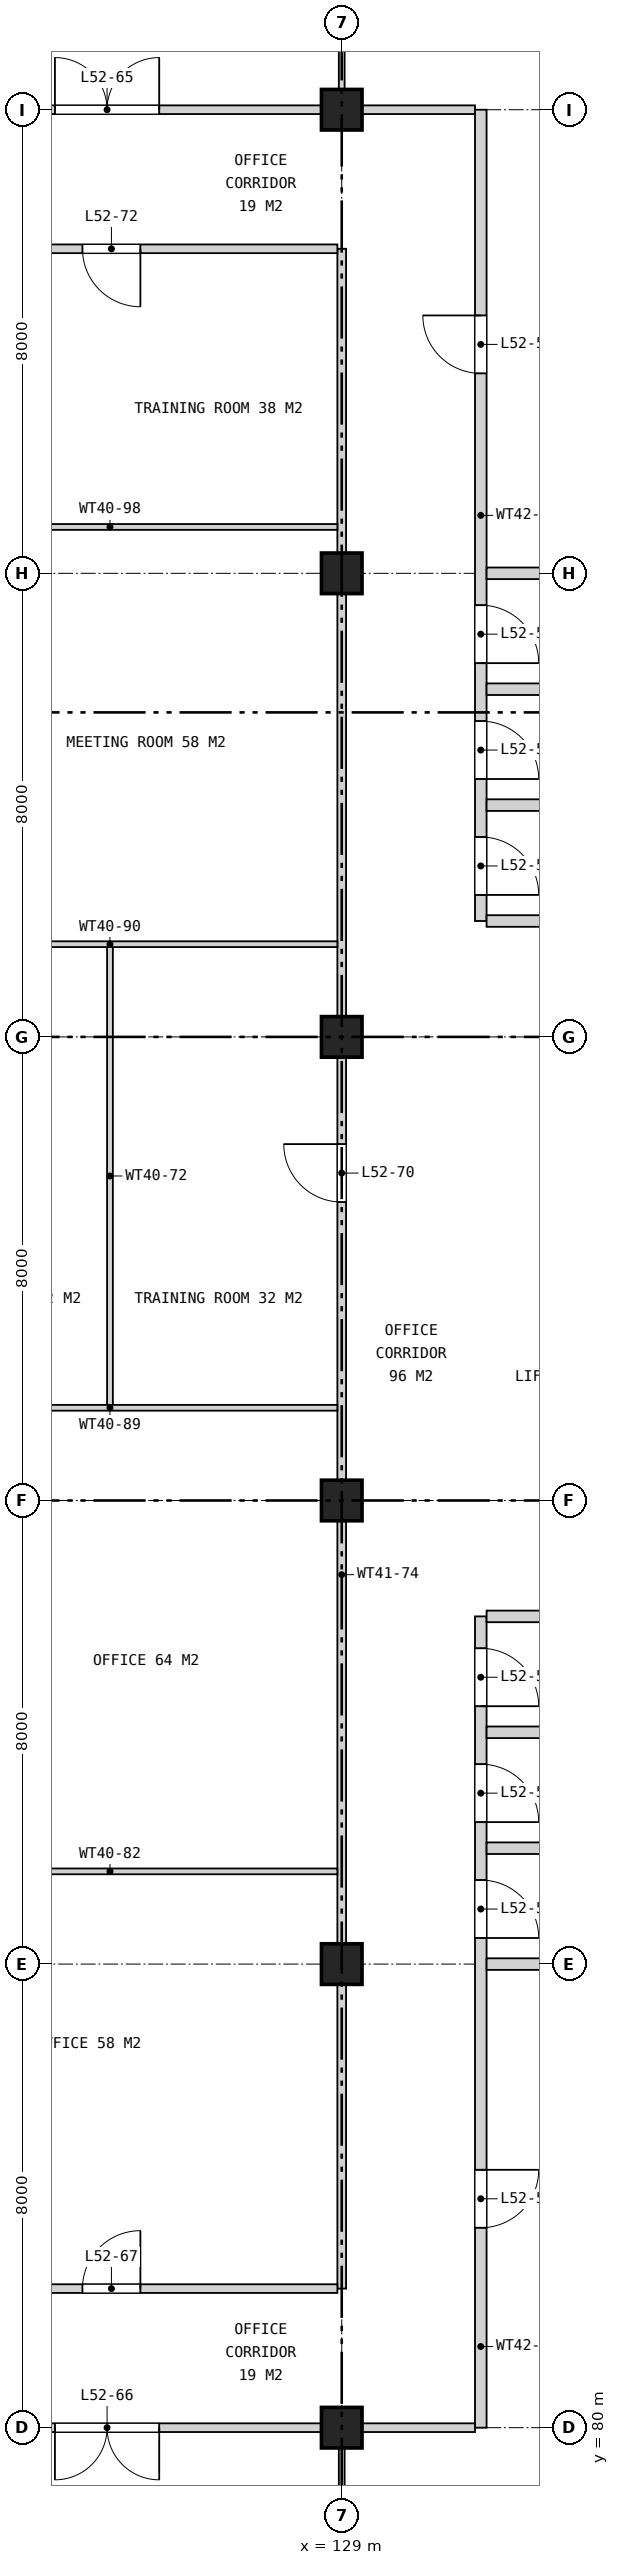
"""IFC4 building model, lengths in metres.
Left out: names, types, materials, properties, quantities, classifications, styles, units other than length and angle.
Written with IfcOpenShell. Run it as: python <this file> out.ifc"""

import sys

from ifc_helpers import new_model, si_unit, direction, frame, frame_2d, origin, origin_2d, place, context, subcontext, project, spatial, rectangle, extrude, element, fill, save


model = new_model("IFC4")
c1 = context("Model", 3, precision=1e-05, world=origin(), true_north=direction((0.0, 1.0)))
c2 = subcontext(c1, "Body", "Model", "MODEL_VIEW")
j1 = project(units=[si_unit("LENGTHUNIT", "METRE"), si_unit("PLANEANGLEUNIT", "RADIAN")], contexts=[c1])
p1 = place(None, origin())
s1 = spatial("IfcSite", under=j1, at=p1, CompositionType="ELEMENT")
p2 = place(p1, origin())
s2 = spatial("IfcBuilding", under=s1, at=p2, CompositionType="ELEMENT")
p3 = place(p2, frame((0.0, 0.0, 245.1)))
s3 = spatial("IfcBuildingStorey", under=s2, at=p3, CompositionType="ELEMENT", Elevation=245.1)
for number, where, z_axis, x_axis in (
    (1, (129.0, 80.0, 0.0), (0.0, 0.0, 1.0), (1.0, 0.0, 0.0)),
    (2, (129.0, 88.0, 0.0), (0.0, 0.0, 1.0), (1.0, 0.0, 0.0)),
    (3, (129.0, 96.0, 0.0), (0.0, 0.0, 1.0), (1.0, 0.0, 0.0)),
    (4, (129.0, 104.0, 0.0), (0.0, 0.0, 1.0), (1.0, 0.0, 0.0)),
    (5, (129.0, 112.0, 0.0), (0.0, 0.0, 1.0), (1.0, 0.0, 0.0)),
    (6, (129.0, 120.0, 0.0), (0.0, 0.0, 1.0), (1.0, 0.0, 0.0)),
):
    element("IfcColumn", number, at=place(p3, frame(where, z_axis=z_axis, x_axis=x_axis)), inside=s3, PredefinedType="COLUMN", context=c2, shape_type="SweptSolid", body=[
        extrude(rectangle(XDim=0.7, YDim=0.7, at=origin_2d()), origin(), (0.0, 0.0, 1.0), 4.2),
    ])
p4 = place(p3, frame((125.0, 97.65, 0.0), z_axis=(0.0, 0.0, 1.0), x_axis=(0.0, 1.0, 0.0)))
e7 = element("IfcWall", 7, at=p4, inside=s3, PredefinedType="PARTITIONING", context=c2, shape_type="SweptSolid", body=[
    extrude(rectangle(XDim=7.9, YDim=0.1, at=frame_2d((3.95, 0.0))), origin(), (0.0, 0.0, 1.0), 3.443),
])
p5 = place(p3, frame((129.0, 71.73, 0.0), z_axis=(0.0, 0.0, 1.0), x_axis=(0.0, 1.0, 0.0)))
e8 = element("IfcWall", 8, at=p5, inside=s3, PredefinedType="PARTITIONING", context=c2, shape_type="SweptSolid", body=[
    extrude(rectangle(XDim=8.195, YDim=0.1, at=frame_2d((4.098, 0.0))), origin(), (0.0, 0.0, 1.0), 3.443),
])
p6 = place(p3, frame((129.0, 82.4, 0.0), z_axis=(0.0, 0.0, 1.0), x_axis=(0.0, 1.0, 0.0)))
e9 = element("IfcWall", 9, at=p6, inside=s3, PredefinedType="PARTITIONING", context=c2, shape_type="SweptSolid", body=[
    extrude(rectangle(XDim=35.2, YDim=0.15, at=frame_2d((17.6, 0.0))), origin(), (0.0, 0.0, 1.0), 3.443),
])
p7 = place(p6, frame((18.75, 0.0, 0.0)))
e10 = element("IfcOpeningElement", 10, at=p7, cuts=e9, PredefinedType="OPENING", context=c2, shape_type="SweptSolid", body=[
    extrude(rectangle(XDim=1.0, YDim=2.1, at=frame_2d((0.5, 1.05))), frame((0.0, 0.085, 0.0), z_axis=(0.0, -1.0, 0.0), x_axis=(1.0, 0.0, 0.0)), (0.0, 0.0, 1.0), 0.17),
])
p8 = place(p3, frame((129.0, 120.075, 0.0), z_axis=(0.0, 0.0, 1.0), x_axis=(0.0, 1.0, 0.0)))
e11 = element("IfcWall", 11, at=p8, inside=s3, PredefinedType="PARTITIONING", context=c2, shape_type="SweptSolid", body=[
    extrude(rectangle(XDim=8.195, YDim=0.1, at=frame_2d((4.098, 0.0))), origin(), (0.0, 0.0, 1.0), 3.443),
])
p9 = place(p3, frame((131.4, 80.0, 0.0), z_axis=(0.0, 0.0, 1.0), x_axis=(0.0, 1.0, 0.0)))
e12 = element("IfcWall", 12, at=p9, inside=s3, PredefinedType="SOLIDWALL", context=c2, shape_type="SweptSolid", body=[
    extrude(rectangle(XDim=14.0, YDim=0.2, at=frame_2d((7.0, 0.0))), origin(), (0.0, 0.0, 1.0), 3.443),
])
p10 = place(p9, frame((12.45, 0.0, 0.0)))
e13 = element("IfcOpeningElement", 13, at=p10, cuts=e12, PredefinedType="OPENING", context=c2, shape_type="SweptSolid", body=[
    extrude(rectangle(XDim=1.0, YDim=2.1, at=frame_2d((0.5, 1.05))), frame((0.0, 0.11, 0.0), z_axis=(0.0, -1.0, 0.0), x_axis=(1.0, 0.0, 0.0)), (0.0, 0.0, 1.0), 0.22),
])
p11 = place(p9, frame((10.45, 0.0, 0.0)))
e14 = element("IfcOpeningElement", 14, at=p11, cuts=e12, PredefinedType="OPENING", context=c2, shape_type="SweptSolid", body=[
    extrude(rectangle(XDim=1.0, YDim=2.1, at=frame_2d((0.5, 1.05))), frame((0.0, 0.11, 0.0), z_axis=(0.0, -1.0, 0.0), x_axis=(1.0, 0.0, 0.0)), (0.0, 0.0, 1.0), 0.22),
])
p12 = place(p9, frame((8.45, 0.0, 0.0)))
e15 = element("IfcOpeningElement", 15, at=p12, cuts=e12, PredefinedType="OPENING", context=c2, shape_type="SweptSolid", body=[
    extrude(rectangle(XDim=1.0, YDim=2.1, at=frame_2d((0.5, 1.05))), frame((0.0, 0.11, 0.0), z_axis=(0.0, -1.0, 0.0), x_axis=(1.0, 0.0, 0.0)), (0.0, 0.0, 1.0), 0.22),
])
p13 = place(p9, frame((3.45, 0.0, 0.0)))
e16 = element("IfcOpeningElement", 16, at=p13, cuts=e12, PredefinedType="OPENING", context=c2, shape_type="SweptSolid", body=[
    extrude(rectangle(XDim=1.0, YDim=2.1, at=frame_2d((0.5, 1.05))), frame((0.0, 0.11, 0.0), z_axis=(0.0, -1.0, 0.0), x_axis=(1.0, 0.0, 0.0)), (0.0, 0.0, 1.0), 0.22),
])
p14 = place(p3, frame((131.4, 106.0, 0.0), z_axis=(0.0, 0.0, 1.0), x_axis=(0.0, 1.0, 0.0)))
e17 = element("IfcWall", 17, at=p14, inside=s3, PredefinedType="SOLIDWALL", context=c2, shape_type="SweptSolid", body=[
    extrude(rectangle(XDim=14.0, YDim=0.2, at=frame_2d((7.0, 0.0))), origin(), (0.0, 0.0, 1.0), 3.443),
])
p15 = place(p14, frame((0.45, 0.0, 0.0)))
e18 = element("IfcOpeningElement", 18, at=p15, cuts=e17, PredefinedType="OPENING", context=c2, shape_type="SweptSolid", body=[
    extrude(rectangle(XDim=1.0, YDim=2.1, at=frame_2d((0.5, 1.05))), frame((0.0, 0.11, 0.0), z_axis=(0.0, -1.0, 0.0), x_axis=(1.0, 0.0, 0.0)), (0.0, 0.0, 1.0), 0.22),
])
p16 = place(p14, frame((2.45, 0.0, 0.0)))
e19 = element("IfcOpeningElement", 19, at=p16, cuts=e17, PredefinedType="OPENING", context=c2, shape_type="SweptSolid", body=[
    extrude(rectangle(XDim=1.0, YDim=2.1, at=frame_2d((0.5, 1.05))), frame((0.0, 0.11, 0.0), z_axis=(0.0, -1.0, 0.0), x_axis=(1.0, 0.0, 0.0)), (0.0, 0.0, 1.0), 0.22),
])
p17 = place(p14, frame((4.45, 0.0, 0.0)))
e20 = element("IfcOpeningElement", 20, at=p17, cuts=e17, PredefinedType="OPENING", context=c2, shape_type="SweptSolid", body=[
    extrude(rectangle(XDim=1.0, YDim=2.1, at=frame_2d((0.5, 1.05))), frame((0.0, 0.11, 0.0), z_axis=(0.0, -1.0, 0.0), x_axis=(1.0, 0.0, 0.0)), (0.0, 0.0, 1.0), 0.22),
])
p18 = place(p14, frame((9.45, 0.0, 0.0)))
e21 = element("IfcOpeningElement", 21, at=p18, cuts=e17, PredefinedType="OPENING", context=c2, shape_type="SweptSolid", body=[
    extrude(rectangle(XDim=1.0, YDim=2.1, at=frame_2d((0.5, 1.05))), frame((0.0, 0.11, 0.0), z_axis=(0.0, -1.0, 0.0), x_axis=(1.0, 0.0, 0.0)), (0.0, 0.0, 1.0), 0.22),
])
p19 = place(p3, frame((112.73, 80.0, 0.0), z_axis=(0.0, 0.0, 1.0), x_axis=(1.0, 0.0, 0.0)))
e22 = element("IfcWall", 22, at=p19, inside=s3, PredefinedType="PARTITIONING", context=c2, shape_type="SweptSolid", body=[
    extrude(rectangle(XDim=18.57, YDim=0.15, at=frame_2d((9.285, 0.0))), origin(), (0.0, 0.0, 1.0), 3.443),
])
p20 = place(p19, frame((11.32, 0.0, 0.0)))
e23 = element("IfcOpeningElement", 23, at=p20, cuts=e22, PredefinedType="OPENING", context=c2, shape_type="SweptSolid", body=[
    extrude(rectangle(XDim=1.8, YDim=2.1, at=frame_2d((0.9, 1.05))), frame((0.0, 0.085, 0.0), z_axis=(0.0, -1.0, 0.0), x_axis=(1.0, 0.0, 0.0)), (0.0, 0.0, 1.0), 0.17),
])
p21 = place(p3, frame((121.075, 82.4, 0.0), z_axis=(0.0, 0.0, 1.0), x_axis=(1.0, 0.0, 0.0)))
e24 = element("IfcWall", 24, at=p21, inside=s3, PredefinedType="PARTITIONING", context=c2, shape_type="SweptSolid", body=[
    extrude(rectangle(XDim=7.85, YDim=0.15, at=frame_2d((3.925, 0.0))), origin(), (0.0, 0.0, 1.0), 3.443),
])
p22 = place(p21, frame((3.45, 0.0, 0.0)))
e25 = element("IfcOpeningElement", 25, at=p22, cuts=e24, PredefinedType="OPENING", context=c2, shape_type="SweptSolid", body=[
    extrude(rectangle(XDim=1.0, YDim=2.1, at=frame_2d((0.5, 1.05))), frame((0.0, 0.085, 0.0), z_axis=(0.0, -1.0, 0.0), x_axis=(1.0, 0.0, 0.0)), (0.0, 0.0, 1.0), 0.17),
])
p23 = place(p3, frame((131.5, 88.0, 0.0), z_axis=(0.0, 0.0, 1.0), x_axis=(1.0, 0.0, 0.0)))
e26 = element("IfcWall", 26, at=p23, inside=s3, PredefinedType="SOLIDWALL", context=c2, shape_type="SweptSolid", body=[
    extrude(rectangle(XDim=5.5, YDim=0.2, at=frame_2d((2.75, 0.0))), origin(), (0.0, 0.0, 1.0), 3.443),
])
p24 = place(p3, frame((121.075, 89.6, 0.0), z_axis=(0.0, 0.0, 1.0), x_axis=(1.0, 0.0, 0.0)))
e27 = element("IfcWall", 27, at=p24, inside=s3, PredefinedType="PARTITIONING", context=c2, shape_type="SweptSolid", body=[
    extrude(rectangle(XDim=7.85, YDim=0.1, at=frame_2d((3.925, 0.0))), origin(), (0.0, 0.0, 1.0), 3.443),
])
for number, where, z_axis, x_axis in (
    (28, (131.5, 90.0, 0.0), (0.0, 0.0, 1.0), (1.0, 0.0, 0.0)),
    (29, (131.5, 92.0, 0.0), (0.0, 0.0, 1.0), (1.0, 0.0, 0.0)),
    (30, (131.5, 94.0, 0.0), (0.0, 0.0, 1.0), (1.0, 0.0, 0.0)),
):
    element("IfcWall", number, at=place(p3, frame(where, z_axis=z_axis, x_axis=x_axis)), inside=s3, PredefinedType="SOLIDWALL", context=c2, shape_type="SweptSolid", body=[
        extrude(rectangle(XDim=5.5, YDim=0.2, at=frame_2d((2.75, 0.0))), origin(), (0.0, 0.0, 1.0), 3.443),
    ])
for number, where, z_axis, x_axis in (
    (31, (121.075, 97.6, 0.0), (0.0, 0.0, 1.0), (1.0, 0.0, 0.0)),
    (32, (121.075, 105.6, 0.0), (0.0, 0.0, 1.0), (1.0, 0.0, 0.0)),
):
    element("IfcWall", number, at=place(p3, frame(where, z_axis=z_axis, x_axis=x_axis)), inside=s3, PredefinedType="PARTITIONING", context=c2, shape_type="SweptSolid", body=[
        extrude(rectangle(XDim=7.85, YDim=0.1, at=frame_2d((3.925, 0.0))), origin(), (0.0, 0.0, 1.0), 3.443),
    ])
for number, where, z_axis, x_axis in (
    (33, (131.5, 106.0, 0.0), (0.0, 0.0, 1.0), (1.0, 0.0, 0.0)),
    (34, (131.5, 108.0, 0.0), (0.0, 0.0, 1.0), (1.0, 0.0, 0.0)),
    (35, (131.5, 110.0, 0.0), (0.0, 0.0, 1.0), (1.0, 0.0, 0.0)),
    (36, (131.5, 112.0, 0.0), (0.0, 0.0, 1.0), (1.0, 0.0, 0.0)),
):
    element("IfcWall", number, at=place(p3, frame(where, z_axis=z_axis, x_axis=x_axis)), inside=s3, PredefinedType="SOLIDWALL", context=c2, shape_type="SweptSolid", body=[
        extrude(rectangle(XDim=5.5, YDim=0.2, at=frame_2d((2.75, 0.0))), origin(), (0.0, 0.0, 1.0), 3.443),
    ])
p25 = place(p3, frame((121.075, 112.8, 0.0), z_axis=(0.0, 0.0, 1.0), x_axis=(1.0, 0.0, 0.0)))
e37 = element("IfcWall", 37, at=p25, inside=s3, PredefinedType="PARTITIONING", context=c2, shape_type="SweptSolid", body=[
    extrude(rectangle(XDim=7.85, YDim=0.1, at=frame_2d((3.925, 0.0))), origin(), (0.0, 0.0, 1.0), 3.443),
])
p26 = place(p3, frame((121.075, 117.6, 0.0), z_axis=(0.0, 0.0, 1.0), x_axis=(1.0, 0.0, 0.0)))
e38 = element("IfcWall", 38, at=p26, inside=s3, PredefinedType="PARTITIONING", context=c2, shape_type="SweptSolid", body=[
    extrude(rectangle(XDim=7.85, YDim=0.15, at=frame_2d((3.925, 0.0))), origin(), (0.0, 0.0, 1.0), 3.443),
])
p27 = place(p26, frame((3.45, 0.0, 0.0)))
e39 = element("IfcOpeningElement", 39, at=p27, cuts=e38, PredefinedType="OPENING", context=c2, shape_type="SweptSolid", body=[
    extrude(rectangle(XDim=1.0, YDim=2.1, at=frame_2d((0.5, 1.05))), frame((0.0, 0.085, 0.0), z_axis=(0.0, -1.0, 0.0), x_axis=(1.0, 0.0, 0.0)), (0.0, 0.0, 1.0), 0.17),
])
p28 = place(p3, frame((112.73, 120.0, 0.0), z_axis=(0.0, 0.0, 1.0), x_axis=(1.0, 0.0, 0.0)))
e40 = element("IfcWall", 40, at=p28, inside=s3, PredefinedType="PARTITIONING", context=c2, shape_type="SweptSolid", body=[
    extrude(rectangle(XDim=18.57, YDim=0.15, at=frame_2d((9.285, 0.0))), origin(), (0.0, 0.0, 1.0), 3.443),
])
p29 = place(p28, frame((11.32, 0.0, 0.0)))
e41 = element("IfcOpeningElement", 41, at=p29, cuts=e40, PredefinedType="OPENING", context=c2, shape_type="SweptSolid", body=[
    extrude(rectangle(XDim=1.8, YDim=2.1, at=frame_2d((0.9, 1.05))), frame((0.0, 0.085, 0.0), z_axis=(0.0, -1.0, 0.0), x_axis=(1.0, 0.0, 0.0)), (0.0, 0.0, 1.0), 0.17),
])
p30 = place(p15, frame((1.0, 0.0, 0.0), z_axis=(0.0, 0.0, 1.0), x_axis=(-1.0, 0.0, 0.0)))
e42 = element("IfcDoor", 42, at=p30, inside=s3, OperationType="SINGLE_SWING_RIGHT", PredefinedType="DOOR", context=c2, shape_type="SweptSolid", body=[
    extrude(rectangle(XDim=1.0, YDim=2.1, at=frame_2d((0.5, 1.05))), frame((0.0, 0.025, 0.0), z_axis=(0.0, -1.0, 0.0), x_axis=(1.0, 0.0, 0.0)), (0.0, 0.0, 1.0), 0.05),
])
fill(e18, e42)
p31 = place(p16, frame((1.0, 0.0, 0.0), z_axis=(0.0, 0.0, 1.0), x_axis=(-1.0, 0.0, 0.0)))
e43 = element("IfcDoor", 43, at=p31, inside=s3, OperationType="SINGLE_SWING_RIGHT", PredefinedType="DOOR", context=c2, shape_type="SweptSolid", body=[
    extrude(rectangle(XDim=1.0, YDim=2.1, at=frame_2d((0.5, 1.05))), frame((0.0, 0.025, 0.0), z_axis=(0.0, -1.0, 0.0), x_axis=(1.0, 0.0, 0.0)), (0.0, 0.0, 1.0), 0.05),
])
fill(e19, e43)
p32 = place(p17, frame((1.0, 0.0, 0.0), z_axis=(0.0, 0.0, 1.0), x_axis=(-1.0, 0.0, 0.0)))
e44 = element("IfcDoor", 44, at=p32, inside=s3, OperationType="SINGLE_SWING_RIGHT", PredefinedType="DOOR", context=c2, shape_type="SweptSolid", body=[
    extrude(rectangle(XDim=1.0, YDim=2.1, at=frame_2d((0.5, 1.05))), frame((0.0, 0.025, 0.0), z_axis=(0.0, -1.0, 0.0), x_axis=(1.0, 0.0, 0.0)), (0.0, 0.0, 1.0), 0.05),
])
fill(e20, e44)
p33 = place(p18, origin())
e45 = element("IfcDoor", 45, at=p33, inside=s3, OperationType="SINGLE_SWING_RIGHT", PredefinedType="DOOR", context=c2, shape_type="SweptSolid", body=[
    extrude(rectangle(XDim=1.0, YDim=2.1, at=frame_2d((0.5, 1.05))), frame((0.0, 0.025, 0.0), z_axis=(0.0, -1.0, 0.0), x_axis=(1.0, 0.0, 0.0)), (0.0, 0.0, 1.0), 0.05),
])
fill(e21, e45)
p34 = place(p10, frame((1.0, 0.0, 0.0), z_axis=(0.0, 0.0, 1.0), x_axis=(-1.0, 0.0, 0.0)))
e46 = element("IfcDoor", 46, at=p34, inside=s3, OperationType="SINGLE_SWING_RIGHT", PredefinedType="DOOR", context=c2, shape_type="SweptSolid", body=[
    extrude(rectangle(XDim=1.0, YDim=2.1, at=frame_2d((0.5, 1.05))), frame((0.0, 0.025, 0.0), z_axis=(0.0, -1.0, 0.0), x_axis=(1.0, 0.0, 0.0)), (0.0, 0.0, 1.0), 0.05),
])
fill(e13, e46)
p35 = place(p11, frame((1.0, 0.0, 0.0), z_axis=(0.0, 0.0, 1.0), x_axis=(-1.0, 0.0, 0.0)))
e47 = element("IfcDoor", 47, at=p35, inside=s3, OperationType="SINGLE_SWING_RIGHT", PredefinedType="DOOR", context=c2, shape_type="SweptSolid", body=[
    extrude(rectangle(XDim=1.0, YDim=2.1, at=frame_2d((0.5, 1.05))), frame((0.0, 0.025, 0.0), z_axis=(0.0, -1.0, 0.0), x_axis=(1.0, 0.0, 0.0)), (0.0, 0.0, 1.0), 0.05),
])
fill(e14, e47)
p36 = place(p12, frame((1.0, 0.0, 0.0), z_axis=(0.0, 0.0, 1.0), x_axis=(-1.0, 0.0, 0.0)))
e48 = element("IfcDoor", 48, at=p36, inside=s3, OperationType="SINGLE_SWING_RIGHT", PredefinedType="DOOR", context=c2, shape_type="SweptSolid", body=[
    extrude(rectangle(XDim=1.0, YDim=2.1, at=frame_2d((0.5, 1.05))), frame((0.0, 0.025, 0.0), z_axis=(0.0, -1.0, 0.0), x_axis=(1.0, 0.0, 0.0)), (0.0, 0.0, 1.0), 0.05),
])
fill(e15, e48)
p37 = place(p13, frame((1.0, 0.0, 0.0), z_axis=(0.0, 0.0, 1.0), x_axis=(-1.0, 0.0, 0.0)))
e49 = element("IfcDoor", 49, at=p37, inside=s3, OperationType="SINGLE_SWING_LEFT", PredefinedType="DOOR", context=c2, shape_type="SweptSolid", body=[
    extrude(rectangle(XDim=1.0, YDim=2.1, at=frame_2d((0.5, 1.05))), frame((0.0, 0.025, 0.0), z_axis=(0.0, -1.0, 0.0), x_axis=(1.0, 0.0, 0.0)), (0.0, 0.0, 1.0), 0.05),
])
fill(e16, e49)
p38 = place(p29, origin())
e50 = element("IfcDoor", 50, at=p38, inside=s3, OperationType="DOUBLE_DOOR_SINGLE_SWING", PredefinedType="DOOR", context=c2, shape_type="SweptSolid", body=[
    extrude(rectangle(XDim=1.8, YDim=2.1, at=frame_2d((0.9, 1.05))), frame((0.0, 0.025, 0.0), z_axis=(0.0, -1.0, 0.0), x_axis=(1.0, 0.0, 0.0)), (0.0, 0.0, 1.0), 0.05),
])
fill(e41, e50)
p39 = place(p20, frame((1.8, 0.0, 0.0), z_axis=(0.0, 0.0, 1.0), x_axis=(-1.0, 0.0, 0.0)))
e51 = element("IfcDoor", 51, at=p39, inside=s3, OperationType="DOUBLE_DOOR_SINGLE_SWING", PredefinedType="DOOR", context=c2, shape_type="SweptSolid", body=[
    extrude(rectangle(XDim=1.8, YDim=2.1, at=frame_2d((0.9, 1.05))), frame((0.0, 0.025, 0.0), z_axis=(0.0, -1.0, 0.0), x_axis=(1.0, 0.0, 0.0)), (0.0, 0.0, 1.0), 0.05),
])
fill(e23, e51)
p40 = place(p22, origin())
e52 = element("IfcDoor", 52, at=p40, inside=s3, OperationType="SINGLE_SWING_RIGHT", PredefinedType="DOOR", context=c2, shape_type="SweptSolid", body=[
    extrude(rectangle(XDim=1.0, YDim=2.1, at=frame_2d((0.5, 1.05))), frame((0.0, 0.025, 0.0), z_axis=(0.0, -1.0, 0.0), x_axis=(1.0, 0.0, 0.0)), (0.0, 0.0, 1.0), 0.05),
])
fill(e25, e52)
p41 = place(p7, origin())
e53 = element("IfcDoor", 53, at=p41, inside=s3, OperationType="SINGLE_SWING_RIGHT", PredefinedType="DOOR", context=c2, shape_type="SweptSolid", body=[
    extrude(rectangle(XDim=1.0, YDim=2.1, at=frame_2d((0.5, 1.05))), frame((0.0, 0.025, 0.0), z_axis=(0.0, -1.0, 0.0), x_axis=(1.0, 0.0, 0.0)), (0.0, 0.0, 1.0), 0.05),
])
fill(e10, e53)
p42 = place(p27, frame((1.0, 0.0, 0.0), z_axis=(0.0, 0.0, 1.0), x_axis=(-1.0, 0.0, 0.0)))
e54 = element("IfcDoor", 54, at=p42, inside=s3, OperationType="SINGLE_SWING_LEFT", PredefinedType="DOOR", context=c2, shape_type="SweptSolid", body=[
    extrude(rectangle(XDim=1.0, YDim=2.1, at=frame_2d((0.5, 1.05))), frame((0.0, 0.025, 0.0), z_axis=(0.0, -1.0, 0.0), x_axis=(1.0, 0.0, 0.0)), (0.0, 0.0, 1.0), 0.05),
])
fill(e39, e54)
save(model, sys.argv[1])
